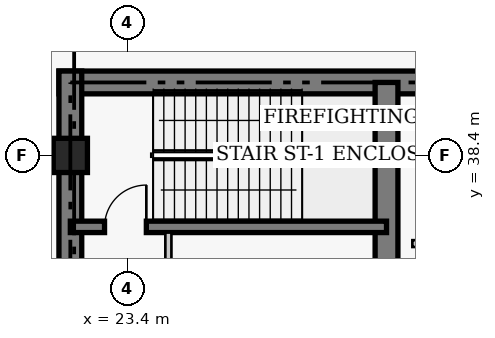
"""IFC4 building model, lengths in metres.
Left out: names, types, materials, properties, quantities, classifications, styles, units other than length and angle.
Written with IfcOpenShell. Run it as: python <this file> out.ifc"""

import sys

from ifc_helpers import new_model, si_unit, direction, frame, frame_2d, origin, origin_2d, place, context, subcontext, project, spatial, rectangle, extrude, element, fill, save


model = new_model("IFC4")
c1 = context("Model", 3, precision=1e-05, world=origin(), true_north=direction((0.0, 1.0)))
c2 = subcontext(c1, "Body", "Model", "MODEL_VIEW")
j1 = project(units=[si_unit("LENGTHUNIT", "METRE"), si_unit("PLANEANGLEUNIT", "RADIAN")], contexts=[c1])
p1 = place(None, origin())
s1 = spatial("IfcSite", under=j1, at=p1, CompositionType="ELEMENT")
p2 = place(p1, origin())
s2 = spatial("IfcBuilding", under=s1, at=p2, CompositionType="ELEMENT")
p3 = place(p2, frame((0.0, 0.0, 240.4)))
s3 = spatial("IfcBuildingStorey", under=s2, at=p3, CompositionType="ELEMENT", Elevation=240.4)
p4 = place(p3, frame((21.6, 40.32, 0.0), z_axis=(0.0, 0.0, 1.0), x_axis=(1.0, 0.0, 0.0)))
e1 = element("IfcWall", 1, at=p4, inside=s3, PredefinedType="SHEAR", context=c2, shape_type="SweptSolid", body=[
    extrude(rectangle(XDim=14.25, YDim=0.6, at=frame_2d((7.125, 0.0))), origin(), (0.0, 0.0, 1.0), 5.0),
])
p5 = place(p3, frame((21.9, 27.05, 0.0), z_axis=(0.0, 0.0, 1.0), x_axis=(0.0, 1.0, 0.0)))
e2 = element("IfcWall", 2, at=p5, inside=s3, PredefinedType="SHEAR", context=c2, shape_type="SweptSolid", body=[
    extrude(rectangle(XDim=13.57, YDim=0.6, at=frame_2d((6.785, 0.0))), origin(), (0.0, 0.0, 1.0), 5.0),
])
p6 = place(p3, frame((30.22, 33.05, 0.0), z_axis=(0.0, 0.0, 1.0), x_axis=(0.0, 1.0, 0.0)))
e3 = element("IfcWall", 3, at=p6, inside=s3, PredefinedType="SHEAR", context=c2, shape_type="SweptSolid", body=[
    extrude(rectangle(XDim=7.27, YDim=0.6, at=frame_2d((3.635, 0.0))), origin(), (0.0, 0.0, 1.0), 5.0),
])
p7 = place(p3, frame((21.9, 36.52, 0.0), z_axis=(0.0, 0.0, 1.0), x_axis=(1.0, 0.0, 0.0)))
e4 = element("IfcWall", 4, at=p7, inside=s3, PredefinedType="SHEAR", context=c2, shape_type="SweptSolid", body=[
    extrude(rectangle(XDim=8.32, YDim=0.3, at=frame_2d((4.16, 0.0))), origin(), (0.0, 0.0, 1.0), 5.0),
])
p8 = place(p7, frame((0.9, 0.0, 0.0)))
e5 = element("IfcOpeningElement", 5, at=p8, cuts=e4, PredefinedType="OPENING", context=c2, shape_type="SweptSolid", body=[
    extrude(rectangle(XDim=1.1, YDim=2.15, at=frame_2d((0.55, 1.075))), frame((0.0, 0.16, 0.0), z_axis=(0.0, -1.0, 0.0), x_axis=(1.0, 0.0, 0.0)), (0.0, 0.0, 1.0), 0.32),
])
p9 = place(p3, frame((21.9, 38.4, 0.0), z_axis=(0.0, 0.0, 1.0), x_axis=(1.0, 0.0, 0.0)))
e6 = element("IfcColumn", 6, at=p9, inside=s3, PredefinedType="COLUMN", context=c2, shape_type="SweptSolid", body=[
    extrude(rectangle(XDim=0.9, YDim=0.9, at=origin_2d()), origin(), (0.0, 0.0, 1.0), 5.0),
])
p10 = place(p3, frame((30.9, 36.08, 0.0), z_axis=(0.0, 0.0, 1.0), x_axis=(1.0, 0.0, 0.0)))
e7 = element("IfcWall", 7, at=p10, inside=s3, PredefinedType="PARTITIONING", context=c2, shape_type="SweptSolid", body=[
    extrude(rectangle(XDim=1.85, YDim=0.18, at=frame_2d((0.925, 0.0))), origin(), (0.0, 0.0, 1.0), 4.76),
])
p11 = place(p10, frame((0.48, 0.0, 0.0)))
e8 = element("IfcOpeningElement", 8, at=p11, cuts=e7, PredefinedType="OPENING", context=c2, shape_type="SweptSolid", body=[
    extrude(rectangle(XDim=0.9, YDim=2.15, at=frame_2d((0.45, 1.075))), frame((0.0, 0.1, 0.0), z_axis=(0.0, -1.0, 0.0), x_axis=(1.0, 0.0, 0.0)), (0.0, 0.0, 1.0), 0.2),
])
p12 = place(p3, frame((24.48, 32.8, 0.0), z_axis=(0.0, 0.0, 1.0), x_axis=(0.0, 1.0, 0.0)))
e9 = element("IfcWall", 9, at=p12, inside=s3, PredefinedType="PARTITIONING", context=c2, shape_type="SweptSolid", body=[
    extrude(rectangle(XDim=3.57, YDim=0.16, at=frame_2d((1.785, 0.0))), origin(), (0.0, 0.0, 1.0), 4.76),
])
p13 = place(p12, frame((1.604, 0.0, 0.0)))
e10 = element("IfcOpeningElement", 10, at=p13, cuts=e9, PredefinedType="OPENING", context=c2, shape_type="SweptSolid", body=[
    extrude(rectangle(XDim=0.9, YDim=2.1, at=frame_2d((0.45, 1.05))), frame((0.0, 0.09, 0.0), z_axis=(0.0, -1.0, 0.0), x_axis=(1.0, 0.0, 0.0)), (0.0, 0.0, 1.0), 0.18),
])
p14 = place(p8, origin())
e11 = element("IfcDoor", 11, at=p14, inside=s3, OperationType="SINGLE_SWING_RIGHT", PredefinedType="DOOR", context=c2, shape_type="SweptSolid", body=[
    extrude(rectangle(XDim=1.1, YDim=2.15, at=frame_2d((0.55, 1.075))), frame((0.0, 0.025, 0.0), z_axis=(0.0, -1.0, 0.0), x_axis=(1.0, 0.0, 0.0)), (0.0, 0.0, 1.0), 0.05),
])
fill(e5, e11)
save(model, sys.argv[1])
